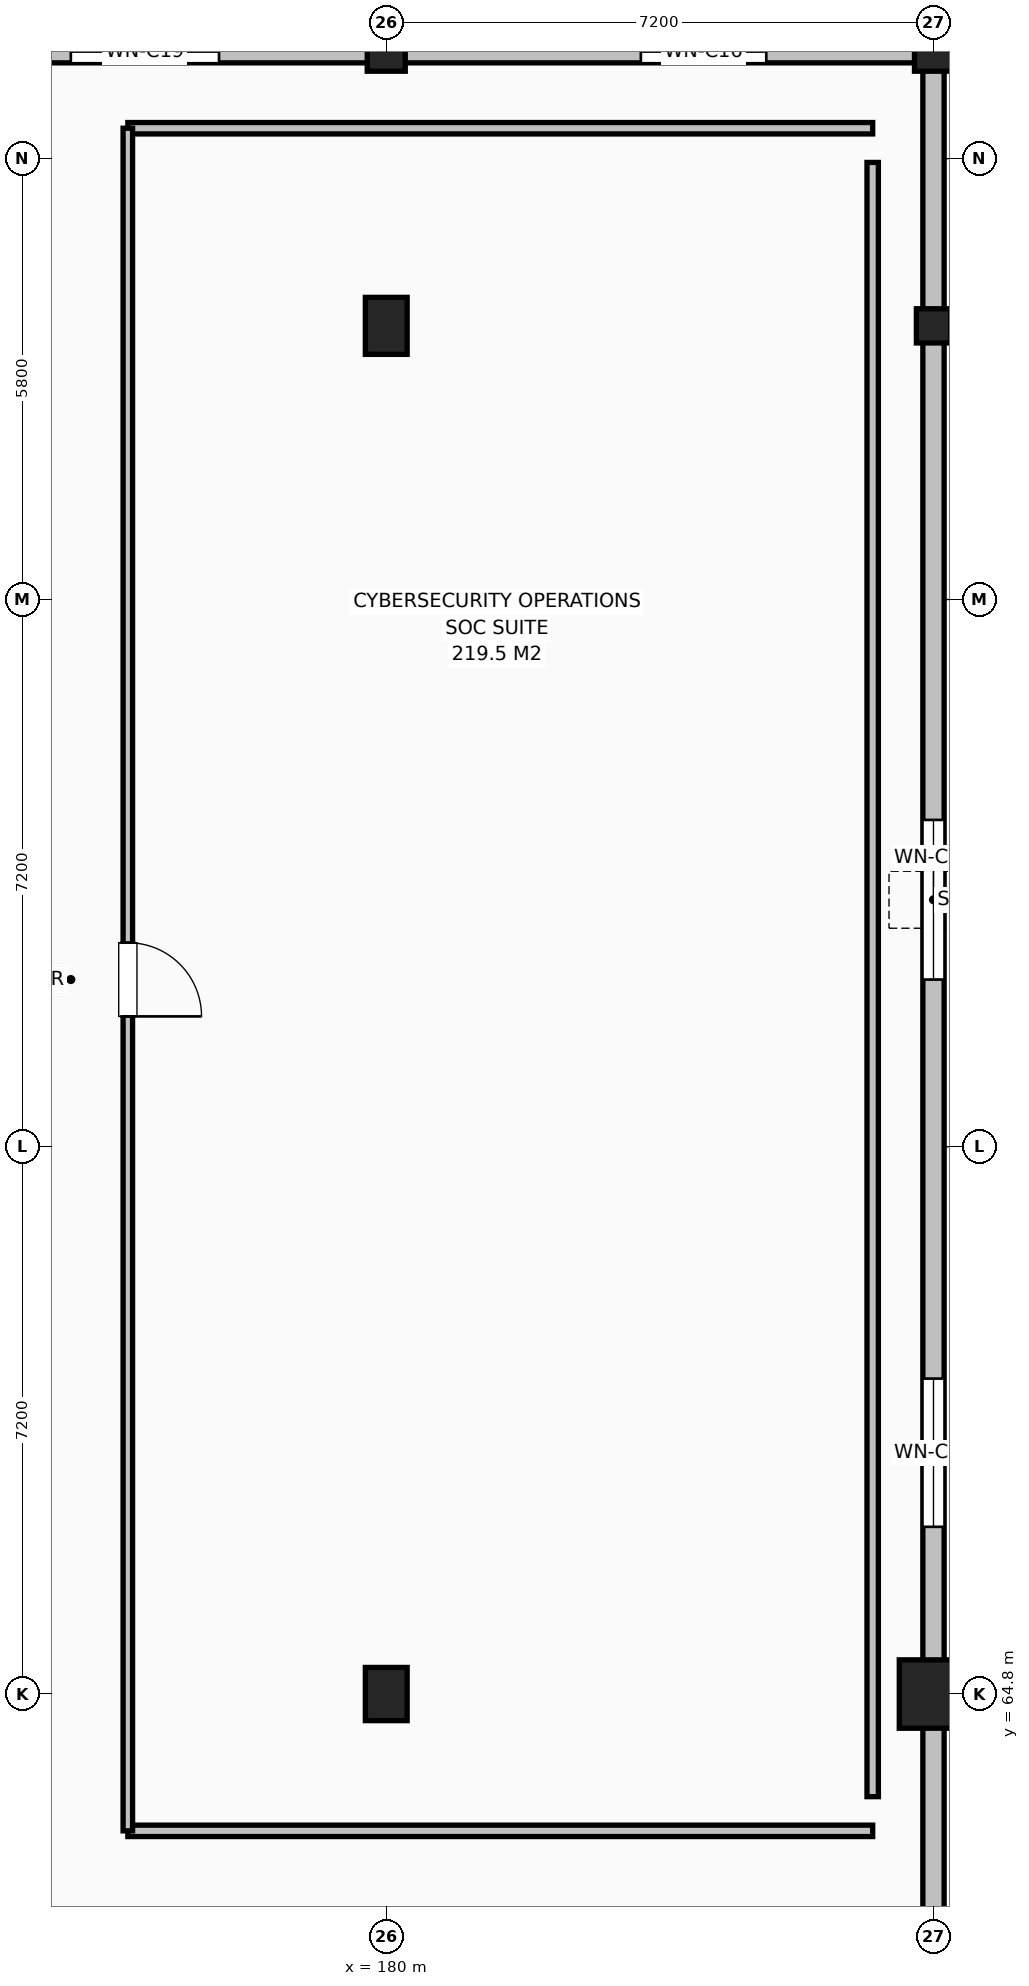
"""IFC4 building model, lengths in metres.
Left out: names, types, materials, properties, quantities, classifications, styles, units other than length and angle.
Written with IfcOpenShell. Run it as: python <this file> out.ifc"""

import sys

from ifc_helpers import new_model, si_unit, direction, frame, frame_2d, origin, origin_2d, place, context, subcontext, project, spatial, rectangle, circle, extrude, element, fill, save


model = new_model("IFC4")
c1 = context("Model", 3, precision=1e-05, world=origin(), true_north=direction((0.0, 1.0)))
c2 = subcontext(c1, "Body", "Model", "MODEL_VIEW")
j1 = project(units=[si_unit("LENGTHUNIT", "METRE"), si_unit("PLANEANGLEUNIT", "RADIAN")], contexts=[c1])
p1 = place(None, origin())
s1 = spatial("IfcSite", under=j1, at=p1, CompositionType="ELEMENT")
p2 = place(p1, origin())
s2 = spatial("IfcBuilding", under=s1, at=p2, CompositionType="ELEMENT")
p3 = place(p2, frame((0.0, 0.0, 9.0)))
s3 = spatial("IfcBuildingStorey", under=s2, at=p3, CompositionType="ELEMENT", Elevation=9.0)
p4 = place(p3, frame((180.0, 64.8, 0.0), z_axis=(0.0, 0.0, 1.0), x_axis=(1.0, 0.0, 0.0)))
e1 = element("IfcColumn", 1, at=p4, inside=s3, PredefinedType="COLUMN", context=c2, shape_type="SweptSolid", body=[
    extrude(rectangle(XDim=0.55, YDim=0.7, at=origin_2d()), origin(), (0.0, 0.0, 1.0), 4.2),
])
p5 = place(p3, frame((180.0, 82.8, 0.0), z_axis=(0.0, 0.0, 1.0), x_axis=(1.0, 0.0, 0.0)))
e2 = element("IfcColumn", 2, at=p5, inside=s3, PredefinedType="COLUMN", context=c2, shape_type="SweptSolid", body=[
    extrude(rectangle(XDim=0.55, YDim=0.75, at=origin_2d()), origin(), (0.0, 0.0, 1.0), 4.2),
])
p6 = place(p3, frame((180.0, 86.4, 0.0), z_axis=(0.0, 0.0, 1.0), x_axis=(1.0, 0.0, 0.0)))
e3 = element("IfcColumn", 3, at=p6, inside=s3, PredefinedType="COLUMN", context=c2, shape_type="SweptSolid", body=[
    extrude(rectangle(XDim=0.5, YDim=0.5, at=origin_2d()), origin(), (0.0, 0.0, 1.0), 4.2),
])
p7 = place(p3, frame((187.2, 64.8, 0.0), z_axis=(0.0, 0.0, 1.0), x_axis=(1.0, 0.0, 0.0)))
e4 = element("IfcColumn", 4, at=p7, inside=s3, PredefinedType="COLUMN", context=c2, shape_type="SweptSolid", body=[
    extrude(circle(Radius=0.45, at=origin_2d()), origin(), (0.0, 0.0, 1.0), 4.2),
])
p8 = place(p3, frame((187.2, 82.8, 0.0), z_axis=(0.0, 0.0, 1.0), x_axis=(1.0, 0.0, 0.0)))
e5 = element("IfcColumn", 5, at=p8, inside=s3, PredefinedType="COLUMN", context=c2, shape_type="SweptSolid", body=[
    extrude(rectangle(XDim=0.45, YDim=0.45, at=origin_2d()), origin(), (0.0, 0.0, 1.0), 4.2),
])
p9 = place(p3, frame((187.2, 86.4, 0.0), z_axis=(0.0, 0.0, 1.0), x_axis=(1.0, 0.0, 0.0)))
e6 = element("IfcColumn", 6, at=p9, inside=s3, PredefinedType="COLUMN", context=c2, shape_type="SweptSolid", body=[
    extrude(rectangle(XDim=0.5, YDim=0.5, at=origin_2d()), origin(), (0.0, 0.0, 1.0), 4.2),
])
p10 = place(p3, frame((187.2, 0.0, 0.0), z_axis=(0.0, 0.0, 1.0), x_axis=(0.0, 1.0, 0.0)))
e7 = element("IfcWall", 7, at=p10, inside=s3, PredefinedType="SOLIDWALL", context=c2, shape_type="SweptSolid", body=[
    extrude(rectangle(XDim=86.4, YDim=0.28, at=frame_2d((43.2, 0.0))), origin(), (0.0, 0.0, 1.0), 3.4),
])
p11 = place(p10, frame((38.2, 0.0, 0.78)))
e8 = element("IfcOpeningElement", 8, at=p11, cuts=e7, PredefinedType="OPENING", context=c2, shape_type="SweptSolid", body=[
    extrude(rectangle(XDim=1.25, YDim=1.7, at=frame_2d((0.625, 0.85))), frame((0.0, 0.15, 0.0), z_axis=(0.0, -1.0, 0.0), x_axis=(1.0, 0.0, 0.0)), (0.0, 0.0, 1.0), 0.3),
])
p12 = place(p10, frame((45.4, 0.0, 0.78)))
e9 = element("IfcOpeningElement", 9, at=p12, cuts=e7, PredefinedType="OPENING", context=c2, shape_type="SweptSolid", body=[
    extrude(rectangle(XDim=1.35, YDim=1.75, at=frame_2d((0.675, 0.875))), frame((0.0, 0.15, 0.0), z_axis=(0.0, -1.0, 0.0), x_axis=(1.0, 0.0, 0.0)), (0.0, 0.0, 1.0), 0.3),
])
p13 = place(p10, frame((59.8, 0.0, 0.78)))
e10 = element("IfcOpeningElement", 10, at=p13, cuts=e7, PredefinedType="OPENING", context=c2, shape_type="SweptSolid", body=[
    extrude(rectangle(XDim=1.65, YDim=1.8, at=frame_2d((0.825, 0.9))), frame((0.0, 0.15, 0.0), z_axis=(0.0, -1.0, 0.0), x_axis=(1.0, 0.0, 0.0)), (0.0, 0.0, 1.0), 0.3),
])
p14 = place(p10, frame((67.0, 0.0, 0.78)))
e11 = element("IfcOpeningElement", 11, at=p14, cuts=e7, PredefinedType="OPENING", context=c2, shape_type="SweptSolid", body=[
    extrude(rectangle(XDim=1.95, YDim=1.8, at=frame_2d((0.975, 0.9))), frame((0.0, 0.15, 0.0), z_axis=(0.0, -1.0, 0.0), x_axis=(1.0, 0.0, 0.0)), (0.0, 0.0, 1.0), 0.3),
])
p15 = place(p10, frame((74.2, 0.0, 0.78)))
e12 = element("IfcOpeningElement", 12, at=p15, cuts=e7, PredefinedType="OPENING", context=c2, shape_type="SweptSolid", body=[
    extrude(rectangle(XDim=2.1, YDim=1.8, at=frame_2d((1.05, 0.9))), frame((0.0, 0.15, 0.0), z_axis=(0.0, -1.0, 0.0), x_axis=(1.0, 0.0, 0.0)), (0.0, 0.0, 1.0), 0.3),
])
p16 = place(p3, frame((187.2, 86.4, 0.0), z_axis=(0.0, 0.0, 1.0), x_axis=(-1.0, 0.0, 0.0)))
e13 = element("IfcWall", 13, at=p16, inside=s3, PredefinedType="SOLIDWALL", context=c2, shape_type="SweptSolid", body=[
    extrude(rectangle(XDim=21.6, YDim=0.28, at=frame_2d((10.8, 0.0))), origin(), (0.0, 0.0, 1.0), 3.4),
])
p17 = place(p16, frame((2.2, 0.0, 0.78)))
e14 = element("IfcOpeningElement", 14, at=p17, cuts=e13, PredefinedType="OPENING", context=c2, shape_type="SweptSolid", body=[
    extrude(rectangle(XDim=1.65, YDim=1.8, at=frame_2d((0.825, 0.9))), frame((0.0, 0.15, 0.0), z_axis=(0.0, -1.0, 0.0), x_axis=(1.0, 0.0, 0.0)), (0.0, 0.0, 1.0), 0.3),
])
p18 = place(p16, frame((9.4, 0.0, 0.78)))
e15 = element("IfcOpeningElement", 15, at=p18, cuts=e13, PredefinedType="OPENING", context=c2, shape_type="SweptSolid", body=[
    extrude(rectangle(XDim=1.95, YDim=1.8, at=frame_2d((0.975, 0.9))), frame((0.0, 0.15, 0.0), z_axis=(0.0, -1.0, 0.0), x_axis=(1.0, 0.0, 0.0)), (0.0, 0.0, 1.0), 0.3),
])
p19 = place(p3, frame((176.6, 85.4, 0.0), z_axis=(0.0, 0.0, 1.0), x_axis=(1.0, 0.0, 0.0)))
e16 = element("IfcWall", 16, at=p19, inside=s3, PredefinedType="PARTITIONING", context=c2, shape_type="SweptSolid", body=[
    extrude(rectangle(XDim=9.8, YDim=0.15, at=frame_2d((4.9, 0.0))), origin(), (0.0, 0.0, 1.0), 3.6),
])
p20 = place(p3, frame((186.4, 63.0, 0.0), z_axis=(0.0, 0.0, 1.0), x_axis=(-1.0, 0.0, 0.0)))
e17 = element("IfcWall", 17, at=p20, inside=s3, PredefinedType="PARTITIONING", context=c2, shape_type="SweptSolid", body=[
    extrude(rectangle(XDim=9.8, YDim=0.15, at=frame_2d((4.9, 0.0))), origin(), (0.0, 0.0, 1.0), 3.307),
])
p21 = place(p3, frame((186.4, 63.45, 0.0), z_axis=(0.0, 0.0, 1.0), x_axis=(0.0, 1.0, 0.0)))
e18 = element("IfcWall", 18, at=p21, inside=s3, PredefinedType="PARTITIONING", context=c2, shape_type="SweptSolid", body=[
    extrude(rectangle(XDim=21.5, YDim=0.15, at=frame_2d((10.75, 0.0))), origin(), (0.0, 0.0, 1.0), 3.174),
])
p22 = place(p3, frame((176.6, 85.4, 0.0), z_axis=(0.0, 0.0, 1.0), x_axis=(0.0, -1.0, 0.0)))
e19 = element("IfcWall", 19, at=p22, inside=s3, PredefinedType="PARTITIONING", context=c2, shape_type="SweptSolid", body=[
    extrude(rectangle(XDim=22.4, YDim=0.125, at=frame_2d((11.2, 0.0))), origin(), (0.0, 0.0, 1.0), 3.174),
])
p23 = place(p22, frame((10.715, 0.0, 0.0)))
e20 = element("IfcOpeningElement", 20, at=p23, cuts=e19, PredefinedType="OPENING", context=c2, shape_type="SweptSolid", body=[
    extrude(rectangle(XDim=0.97, YDim=2.15, at=frame_2d((0.485, 1.075))), frame((0.0, 0.073, 0.0), z_axis=(0.0, -1.0, 0.0), x_axis=(1.0, 0.0, 0.0)), (0.0, 0.0, 1.0), 0.145),
])
p24 = place(p14, origin())
e21 = element("IfcWindow", 21, at=p24, inside=s3, PartitioningType="SINGLE_PANEL", PredefinedType="WINDOW", context=c2, shape_type="SweptSolid", body=[
    extrude(rectangle(XDim=1.95, YDim=1.8, at=frame_2d((0.975, 0.9))), frame((0.0, 0.03, 0.0), z_axis=(0.0, -1.0, 0.0), x_axis=(1.0, 0.0, 0.0)), (0.0, 0.0, 1.0), 0.06),
])
fill(e11, e21)
p25 = place(p15, origin())
e22 = element("IfcWindow", 22, at=p25, inside=s3, PartitioningType="SINGLE_PANEL", PredefinedType="WINDOW", context=c2, shape_type="SweptSolid", body=[
    extrude(rectangle(XDim=2.1, YDim=1.8, at=frame_2d((1.05, 0.9))), frame((0.0, 0.03, 0.0), z_axis=(0.0, -1.0, 0.0), x_axis=(1.0, 0.0, 0.0)), (0.0, 0.0, 1.0), 0.06),
])
fill(e12, e22)
p26 = place(p17, origin())
e23 = element("IfcWindow", 23, at=p26, inside=s3, PartitioningType="SINGLE_PANEL", PredefinedType="WINDOW", context=c2, shape_type="SweptSolid", body=[
    extrude(rectangle(XDim=1.65, YDim=1.8, at=frame_2d((0.825, 0.9))), frame((0.0, 0.03, 0.0), z_axis=(0.0, -1.0, 0.0), x_axis=(1.0, 0.0, 0.0)), (0.0, 0.0, 1.0), 0.06),
])
fill(e14, e23)
p27 = place(p18, origin())
e24 = element("IfcWindow", 24, at=p27, inside=s3, PartitioningType="SINGLE_PANEL", PredefinedType="WINDOW", context=c2, shape_type="SweptSolid", body=[
    extrude(rectangle(XDim=1.95, YDim=1.8, at=frame_2d((0.975, 0.9))), frame((0.0, 0.03, 0.0), z_axis=(0.0, -1.0, 0.0), x_axis=(1.0, 0.0, 0.0)), (0.0, 0.0, 1.0), 0.06),
])
fill(e15, e24)
p28 = place(p23, origin())
e25 = element("IfcDoor", 25, at=p28, inside=s3, OperationType="SINGLE_SWING_RIGHT", PredefinedType="DOOR", context=c2, shape_type="SweptSolid", body=[
    extrude(rectangle(XDim=0.97, YDim=2.15, at=frame_2d((0.485, 1.075))), frame((0.0, 0.025, 0.0), z_axis=(0.0, -1.0, 0.0), x_axis=(1.0, 0.0, 0.0)), (0.0, 0.0, 1.0), 0.05),
])
fill(e20, e25)
save(model, sys.argv[1])
